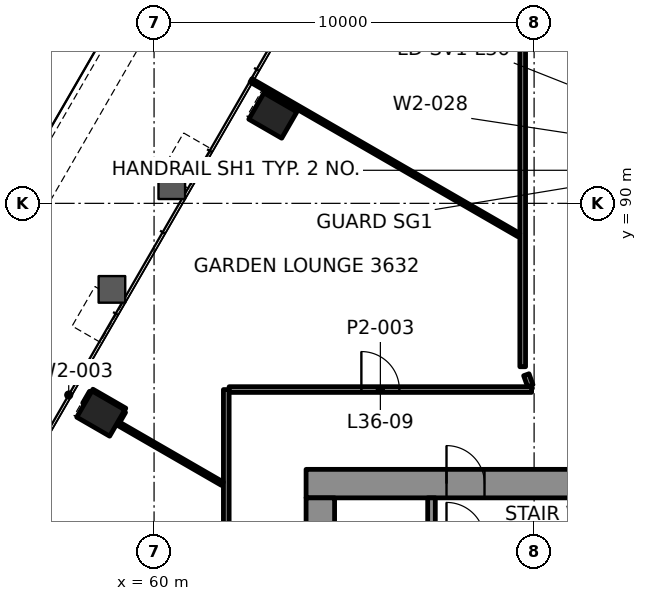
"""IFC4 building model, lengths in metres.
Left out: names, types, materials, properties, quantities, classifications, styles, units other than length and angle.
Written with IfcOpenShell. Run it as: python <this file> out.ifc"""

import sys

from ifc_helpers import new_model, si_unit, direction, frame, frame_2d, origin, origin_2d, place, context, subcontext, project, spatial, rectangle, hollow_rectangle, extrude, element, fill, save


model = new_model("IFC4")
c1 = context("Model", 3, precision=1e-05, world=origin(), true_north=direction((0.0, 1.0)))
c2 = subcontext(c1, "Body", "Model", "MODEL_VIEW")
j1 = project(units=[si_unit("LENGTHUNIT", "METRE"), si_unit("PLANEANGLEUNIT", "RADIAN")], contexts=[c1])
p1 = place(None, origin())
s1 = spatial("IfcSite", under=j1, at=p1, CompositionType="ELEMENT")
p2 = place(p1, origin())
s2 = spatial("IfcBuilding", under=s1, at=p2, CompositionType="ELEMENT")
p3 = place(p2, frame((0.0, 0.0, 159.7)))
s3 = spatial("IfcBuildingStorey", under=s2, at=p3, CompositionType="ELEMENT", Elevation=159.7)
for number, where, z_axis, x_axis in (
    (1, (63.125, 92.31, -0.0), (0.0, 0.0, 1.0), (-0.5, -0.866, 0.0)),
    (2, (58.598, 84.469, -0.0), (0.0, 0.0, 1.0), (-0.5, -0.866, 0.0)),
):
    element("IfcColumn", number, at=place(p3, frame(where, z_axis=z_axis, x_axis=x_axis)), inside=s3, PredefinedType="COLUMN", context=c2, shape_type="SweptSolid", body=[
        extrude(hollow_rectangle(XDim=0.8, YDim=1.0, WallThickness=0.05, at=origin_2d()), origin(), (0.0, 0.0, 1.0), 3.9),
    ])
p4 = place(p3, frame((64.0, 82.625, 0.0), z_axis=(0.0, 0.0, 1.0), x_axis=(1.0, 0.0, 0.0)))
e3 = element("IfcWall", 3, at=p4, inside=s3, PredefinedType="SHEAR", context=c2, shape_type="SweptSolid", body=[
    extrude(rectangle(XDim=22.0, YDim=0.75, at=frame_2d((11.0, 0.0))), origin(), (0.0, 0.0, 1.0), 3.7),
])
p5 = place(p4, frame((3.695, 0.0, 0.0)))
e4 = element("IfcOpeningElement", 4, at=p5, cuts=e3, PredefinedType="OPENING", context=c2, shape_type="SweptSolid", body=[
    extrude(rectangle(XDim=1.0, YDim=2.1, at=frame_2d((0.5, 1.05))), frame((0.0, 0.385, 0.0), z_axis=(0.0, -1.0, 0.0), x_axis=(1.0, 0.0, 0.0)), (0.0, 0.0, 1.0), 0.77),
])
p6 = place(p4, frame((17.505, 0.0, 0.0)))
e5 = element("IfcOpeningElement", 5, at=p6, cuts=e3, PredefinedType="OPENING", context=c2, shape_type="SweptSolid", body=[
    extrude(rectangle(XDim=1.0, YDim=2.1, at=frame_2d((0.5, 1.05))), frame((0.0, 0.385, 0.0), z_axis=(0.0, -1.0, 0.0), x_axis=(1.0, 0.0, 0.0)), (0.0, 0.0, 1.0), 0.77),
])
p7 = place(p4, frame((10.65, 0.0, 0.0)))
e6 = element("IfcOpeningElement", 6, at=p7, cuts=e3, PredefinedType="OPENING", context=c2, shape_type="SweptSolid", body=[
    extrude(rectangle(XDim=0.9, YDim=2.1, at=frame_2d((0.45, 1.05))), frame((0.0, 0.385, 0.0), z_axis=(0.0, -1.0, 0.0), x_axis=(1.0, 0.0, 0.0)), (0.0, 0.0, 1.0), 0.77),
])
p8 = place(p3, frame((64.375, 67.75, 0.0), z_axis=(0.0, 0.0, 1.0), x_axis=(0.0, 1.0, 0.0)))
e7 = element("IfcWall", 7, at=p8, inside=s3, PredefinedType="SHEAR", context=c2, shape_type="SweptSolid", body=[
    extrude(rectangle(XDim=14.5, YDim=0.75, at=frame_2d((7.25, 0.0))), origin(), (0.0, 0.0, 1.0), 3.7),
])
p9 = place(p8, frame((4.65, 0.0, 0.0)))
e8 = element("IfcOpeningElement", 8, at=p9, cuts=e7, PredefinedType="OPENING", context=c2, shape_type="SweptSolid", body=[
    extrude(rectangle(XDim=1.8, YDim=2.1, at=frame_2d((0.9, 1.05))), frame((0.0, 0.385, 0.0), z_axis=(0.0, -1.0, 0.0), x_axis=(1.0, 0.0, 0.0)), (0.0, 0.0, 1.0), 0.77),
])
p10 = place(p8, frame((2.55, 0.0, 0.0)))
e9 = element("IfcOpeningElement", 9, at=p10, cuts=e7, PredefinedType="OPENING", context=c2, shape_type="SweptSolid", body=[
    extrude(rectangle(XDim=0.9, YDim=2.1, at=frame_2d((0.45, 1.05))), frame((0.0, 0.385, 0.0), z_axis=(0.0, -1.0, 0.0), x_axis=(1.0, 0.0, 0.0)), (0.0, 0.0, 1.0), 0.77),
])
p11 = place(p8, frame((10.35, 0.0, 0.0)))
e10 = element("IfcOpeningElement", 10, at=p11, cuts=e7, PredefinedType="OPENING", context=c2, shape_type="SweptSolid", body=[
    extrude(rectangle(XDim=0.9, YDim=2.1, at=frame_2d((0.45, 1.05))), frame((0.0, 0.385, 0.0), z_axis=(0.0, -1.0, 0.0), x_axis=(1.0, 0.0, 0.0)), (0.0, 0.0, 1.0), 0.77),
])
p12 = place(p3, frame((61.976, 85.1, 0.0), z_axis=(0.0, 0.0, 1.0), x_axis=(1.0, 0.0, 0.0)))
e11 = element("IfcWall", 11, at=p12, inside=s3, PredefinedType="PARTITIONING", context=c2, shape_type="SweptSolid", body=[
    extrude(rectangle(XDim=7.958, YDim=0.15, at=frame_2d((3.979, 0.0))), origin(), (0.0, 0.0, 1.0), 3.1),
])
p13 = place(p12, frame((3.479, 0.0, 0.0)))
e12 = element("IfcOpeningElement", 12, at=p13, cuts=e11, PredefinedType="OPENING", context=c2, shape_type="SweptSolid", body=[
    extrude(rectangle(XDim=1.0, YDim=2.1, at=frame_2d((0.5, 1.05))), frame((0.0, 0.085, 0.0), z_axis=(0.0, -1.0, 0.0), x_axis=(1.0, 0.0, 0.0)), (0.0, 0.0, 1.0), 0.17),
])
p14 = place(p3, frame((59.057, 84.263, 0.0), z_axis=(0.0, 0.0, 1.0), x_axis=(0.500264001326, 0.865872928886, 0.0)))
e13 = element("IfcWall", 13, at=p14, inside=s3, PredefinedType="PARTITIONING", context=c2, shape_type="SweptSolid", body=[
    extrude(rectangle(XDim=0.299, YDim=0.1, at=frame_2d((0.149, 0.0))), origin(), (0.0, 0.0, 1.0), 3.1),
])
p15 = place(p3, frame((58.166, 84.72, 0.0), z_axis=(0.0, 0.0, 1.0), x_axis=(0.499601298118, 0.866255472086, 0.0)))
e14 = element("IfcWall", 14, at=p15, inside=s3, PredefinedType="PARTITIONING", context=c2, shape_type="SweptSolid", body=[
    extrude(rectangle(XDim=0.349, YDim=0.1, at=frame_2d((0.174, 0.0))), origin(), (0.0, 0.0, 1.0), 3.1),
])
p16 = place(p3, frame((69.7, 85.7, 0.0), z_axis=(0.0, 0.0, 1.0), x_axis=(0.0, 1.0, 0.0)))
e15 = element("IfcWall", 15, at=p16, inside=s3, PredefinedType="PARTITIONING", context=c2, shape_type="SweptSolid", body=[
    extrude(rectangle(XDim=10.999, YDim=0.15, at=frame_2d((5.5, 0.0))), origin(), (0.0, 0.0, 1.0), 3.022),
])
p17 = place(p3, frame((61.9, 68.476, 0.0), z_axis=(0.0, 0.0, 1.0), x_axis=(0.0, 1.0, 0.0)))
e16 = element("IfcWall", 16, at=p17, inside=s3, PredefinedType="PARTITIONING", context=c2, shape_type="SweptSolid", body=[
    extrude(rectangle(XDim=16.624, YDim=0.15, at=frame_2d((8.312, 0.0))), origin(), (0.0, 0.0, 1.0), 3.1),
])
p18 = place(p17, frame((8.064, 0.0, 0.0)))
e17 = element("IfcOpeningElement", 17, at=p18, cuts=e16, PredefinedType="OPENING", context=c2, shape_type="SweptSolid", body=[
    extrude(rectangle(XDim=1.0, YDim=2.1, at=frame_2d((0.5, 1.05))), frame((0.0, 0.085, 0.0), z_axis=(0.0, -1.0, 0.0), x_axis=(1.0, 0.0, 0.0)), (0.0, 0.0, 1.0), 0.17),
])
p19 = place(p3, frame((69.899, 85.2, 0.0), z_axis=(0.0, 0.0, 1.0), x_axis=(-0.33638665492, 0.941723960825, 0.0)))
e18 = element("IfcWall", 18, at=p19, inside=s3, PredefinedType="PARTITIONING", context=c2, shape_type="SweptSolid", body=[
    extrude(rectangle(XDim=0.308, YDim=0.15, at=frame_2d((0.154, 0.0))), origin(), (0.0, 0.0, 1.0), 3.1),
])
p20 = place(p3, frame((69.599, 89.166, 0.0), z_axis=(0.0, 0.0, 1.0), x_axis=(-0.866026732215, 0.499997699084, 0.0)))
e19 = element("IfcWall", 19, at=p20, inside=s3, PredefinedType="PARTITIONING", context=c2, shape_type="SweptSolid", body=[
    extrude(rectangle(XDim=8.139, YDim=0.1, at=frame_2d((4.069, 0.0))), origin(), (0.0, 0.0, 1.0), 2.865),
])
p21 = place(p3, frame((59.231, 84.566, 0.0), z_axis=(0.0, 0.0, 1.0), x_axis=(-0.866039090965, 0.499976292358, 0.0)))
e20 = element("IfcWall", 20, at=p21, inside=s3, PredefinedType="PARTITIONING", context=c2, shape_type="SweptSolid", body=[
    extrude(rectangle(XDim=0.999, YDim=0.1, at=frame_2d((0.5, 0.0))), origin(), (0.0, 0.0, 1.0), 2.865),
])
p22 = place(p3, frame((61.799, 82.622, 0.0), z_axis=(0.0, 0.0, 1.0), x_axis=(-0.866015079179, 0.500017882314, 0.0)))
e21 = element("IfcWall", 21, at=p22, inside=s3, PredefinedType="PARTITIONING", context=c2, shape_type="SweptSolid", body=[
    extrude(rectangle(XDim=3.195, YDim=0.1, at=frame_2d((1.598, 0.0))), origin(), (0.0, 0.0, 1.0), 3.1),
])
p23 = place(p3, frame((69.117, 111.388, 0.0), z_axis=(0.0, 0.0, 1.0), x_axis=(-0.49999896751, -0.866025999892, 0.0)))
e22 = element("IfcWall", 22, at=p23, inside=s3, PredefinedType="SOLIDWALL", context=c2, shape_type="SweptSolid", body=[
    extrude(rectangle(XDim=57.143, YDim=0.8, at=frame_2d((28.571, 0.0))), origin(), (0.0, 0.0, 1.0), 0.9),
])
p24 = place(p3, frame((67.3, 81.28, 0.0), z_axis=(0.0, 0.0, 1.0), x_axis=(0.0, 1.0, 0.0)))
e23 = element("IfcWall", 23, at=p24, inside=s3, PredefinedType="PARTITIONING", context=c2, shape_type="SweptSolid", body=[
    extrude(rectangle(XDim=0.97, YDim=0.2, at=frame_2d((0.485, 0.0))), origin(), (0.0, 0.0, 1.0), 3.7),
])
p25 = place(p13, origin())
e24 = element("IfcDoor", 24, at=p25, inside=s3, OperationType="SINGLE_SWING_LEFT", PredefinedType="DOOR", context=c2, shape_type="SweptSolid", body=[
    extrude(rectangle(XDim=1.0, YDim=2.1, at=frame_2d((0.5, 1.05))), frame((0.0, 0.025, 0.0), z_axis=(0.0, -1.0, 0.0), x_axis=(1.0, 0.0, 0.0)), (0.0, 0.0, 1.0), 0.05),
])
fill(e12, e24)
p26 = place(p5, origin())
e25 = element("IfcDoor", 25, at=p26, inside=s3, OperationType="SINGLE_SWING_LEFT", PredefinedType="DOOR", context=c2, shape_type="SweptSolid", body=[
    extrude(rectangle(XDim=1.0, YDim=2.1, at=frame_2d((0.5, 1.05))), frame((0.0, 0.095, 0.0), z_axis=(0.0, -1.0, 0.0), x_axis=(1.0, 0.0, 0.0)), (0.0, 0.0, 1.0), 0.19),
])
fill(e4, e25)
save(model, sys.argv[1])
